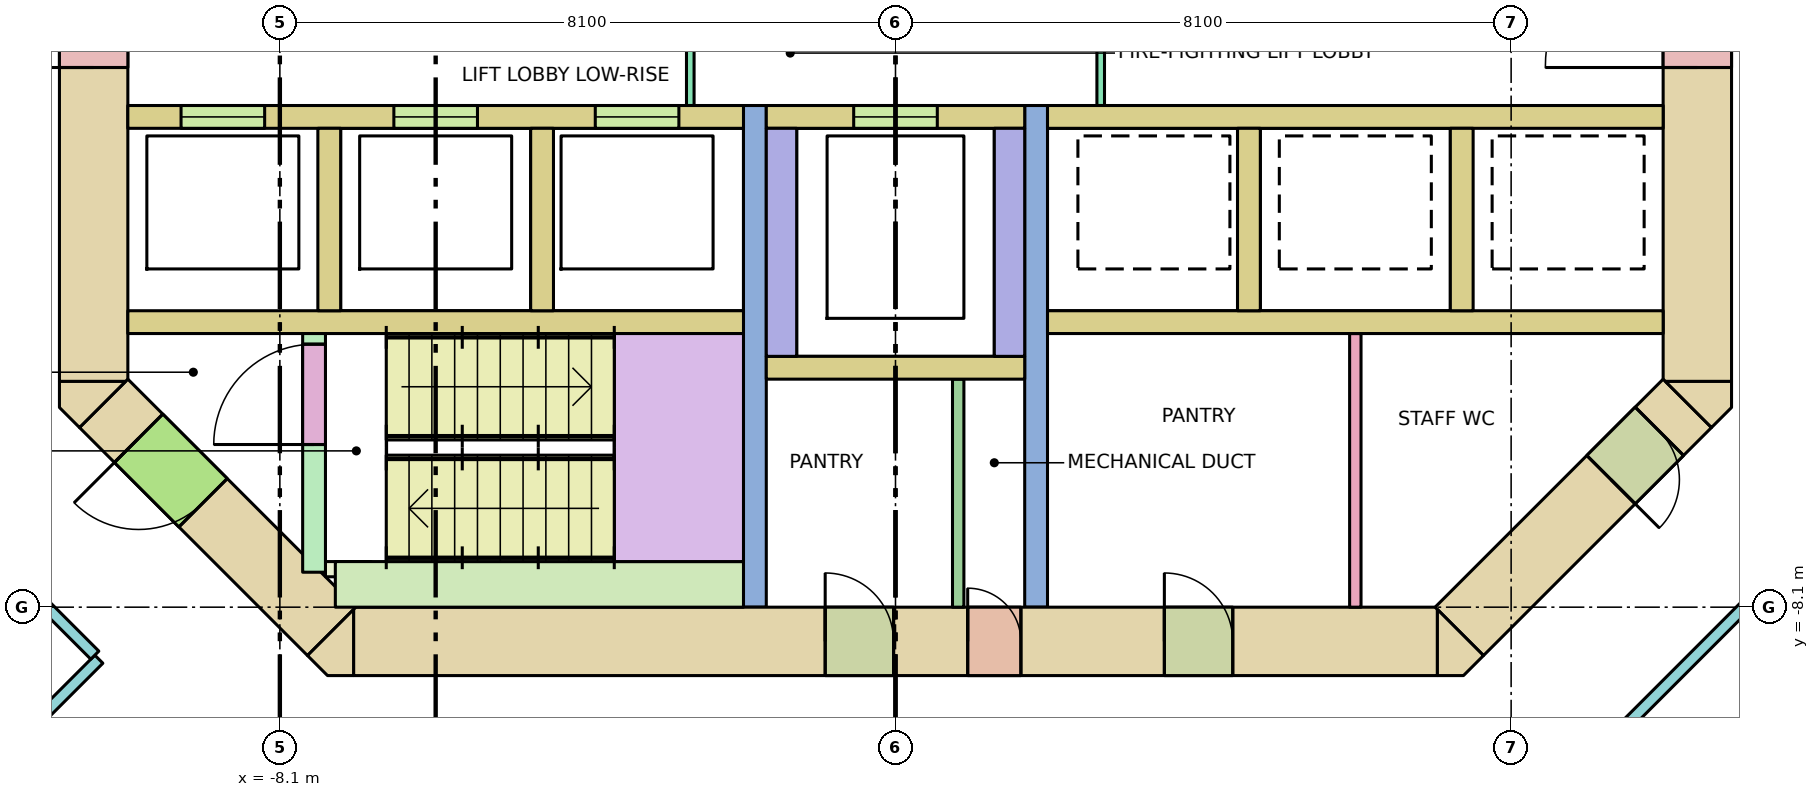
"""IFC4 building model, lengths in metres.
Left out: names, types, materials, properties, quantities, classifications, styles, units other than length and angle.
Written with IfcOpenShell. Run it as: python <this file> out.ifc"""

import sys

from ifc_helpers import new_model, si_unit, direction, frame, frame_2d, origin, place, context, subcontext, project, spatial, polyline, rectangle, outline, extrude, element, fill, save


model = new_model("IFC4")
c1 = context("Model", 3, precision=1e-05, world=origin(), true_north=direction((0.0, 1.0)))
c2 = subcontext(c1, "Body", "Model", "MODEL_VIEW")
j1 = project(units=[si_unit("LENGTHUNIT", "METRE"), si_unit("PLANEANGLEUNIT", "RADIAN")], contexts=[c1])
p1 = place(None, origin())
s1 = spatial("IfcSite", under=j1, at=p1, CompositionType="ELEMENT")
p2 = place(p1, origin())
s2 = spatial("IfcBuilding", under=s1, at=p2, CompositionType="ELEMENT")
p3 = place(p2, frame((0.0, 0.0, 127.6)))
s3 = spatial("IfcBuildingStorey", under=s2, at=p3, CompositionType="ELEMENT", Elevation=127.6)
p4 = place(p3, frame((-7.13, -8.55, -0.28), z_axis=(0.0, 0.0, 1.0), x_axis=(1.0, 0.0, 0.0)))
e1 = element("IfcWall", 1, at=p4, inside=s3, PredefinedType="SHEAR", context=c2, shape_type="SweptSolid", body=[
    extrude(rectangle(XDim=14.26, YDim=0.9, at=frame_2d((7.13, 0.0))), origin(), (0.0, 0.0, 1.0), 3.8),
])
p5 = place(p4, frame((8.08, 0.0, 0.28)))
e2 = element("IfcOpeningElement", 2, at=p5, cuts=e1, PredefinedType="OPENING", context=c2, shape_type="SweptSolid", body=[
    extrude(rectangle(XDim=0.7, YDim=2.1, at=frame_2d((0.35, 1.05))), frame((0.0, 0.46, 0.0), z_axis=(0.0, -1.0, 0.0), x_axis=(1.0, 0.0, 0.0)), (0.0, 0.0, 1.0), 0.92),
])
p6 = place(p4, frame((6.205, 0.0, 0.28)))
e3 = element("IfcOpeningElement", 3, at=p6, cuts=e1, PredefinedType="OPENING", context=c2, shape_type="SweptSolid", body=[
    extrude(rectangle(XDim=0.9, YDim=2.1, at=frame_2d((0.45, 1.05))), frame((0.0, 0.46, 0.0), z_axis=(0.0, -1.0, 0.0), x_axis=(1.0, 0.0, 0.0)), (0.0, 0.0, 1.0), 0.92),
])
p7 = place(p4, frame((10.667, 0.0, 0.28)))
e4 = element("IfcOpeningElement", 4, at=p7, cuts=e1, PredefinedType="OPENING", context=c2, shape_type="SweptSolid", body=[
    extrude(rectangle(XDim=0.9, YDim=2.1, at=frame_2d((0.45, 1.05))), frame((0.0, 0.46, 0.0), z_axis=(0.0, -1.0, 0.0), x_axis=(1.0, 0.0, 0.0)), (0.0, 0.0, 1.0), 0.92),
])
p8 = place(p3, frame((-10.55, -5.13, -0.28), z_axis=(0.0, 0.0, 1.0), x_axis=(0.0, 1.0, 0.0)))
e5 = element("IfcWall", 5, at=p8, inside=s3, PredefinedType="SHEAR", context=c2, shape_type="SweptSolid", body=[
    extrude(rectangle(XDim=10.26, YDim=0.9, at=frame_2d((5.13, 0.0))), origin(), (0.0, 0.0, 1.0), 3.8),
])
p9 = place(p8, frame((4.13, 0.0, 0.28)))
e6 = element("IfcOpeningElement", 6, at=p9, cuts=e5, PredefinedType="OPENING", context=c2, shape_type="SweptSolid", body=[
    extrude(rectangle(XDim=2.0, YDim=2.1, at=frame_2d((1.0, 1.05))), frame((0.0, 0.46, 0.0), z_axis=(0.0, -1.0, 0.0), x_axis=(1.0, 0.0, 0.0)), (0.0, 0.0, 1.0), 0.92),
])
p10 = place(p3, frame((10.55, -5.13, -0.28), z_axis=(0.0, 0.0, 1.0), x_axis=(0.0, 1.0, 0.0)))
e7 = element("IfcWall", 7, at=p10, inside=s3, PredefinedType="SHEAR", context=c2, shape_type="SweptSolid", body=[
    extrude(rectangle(XDim=10.26, YDim=0.9, at=frame_2d((5.13, 0.0))), origin(), (0.0, 0.0, 1.0), 3.8),
])
p11 = place(p10, frame((4.13, 0.0, 0.28)))
e8 = element("IfcOpeningElement", 8, at=p11, cuts=e7, PredefinedType="OPENING", context=c2, shape_type="SweptSolid", body=[
    extrude(rectangle(XDim=2.0, YDim=2.1, at=frame_2d((1.0, 1.05))), frame((0.0, 0.46, 0.0), z_axis=(0.0, -1.0, 0.0), x_axis=(1.0, 0.0, 0.0)), (0.0, 0.0, 1.0), 0.92),
])
p12 = place(p3, frame((10.418, -5.418, -0.28), z_axis=(0.0, 0.0, 1.0), x_axis=(-0.707106781187, -0.707106781187, 0.0)))
e9 = element("IfcWall", 9, at=p12, inside=s3, PredefinedType="SHEAR", context=c2, shape_type="SweptSolid", body=[
    extrude(rectangle(XDim=4.243, YDim=0.9, at=frame_2d((2.121, 0.0))), origin(), (0.0, 0.0, 1.0), 3.8),
])
p13 = place(p12, frame((0.52, 0.0, 0.28)))
e10 = element("IfcOpeningElement", 10, at=p13, cuts=e9, PredefinedType="OPENING", context=c2, shape_type="SweptSolid", body=[
    extrude(rectangle(XDim=0.9, YDim=2.1, at=frame_2d((0.45, 1.05))), frame((0.0, 0.46, 0.0), z_axis=(0.0, -1.0, 0.0), x_axis=(1.0, 0.0, 0.0)), (0.0, 0.0, 1.0), 0.92),
])
p14 = place(p3, frame((-7.418, -8.418, -0.28), z_axis=(0.0, 0.0, 1.0), x_axis=(-0.707106781187, 0.707106781187, 0.0)))
e11 = element("IfcWall", 11, at=p14, inside=s3, PredefinedType="SHEAR", context=c2, shape_type="SweptSolid", body=[
    extrude(rectangle(XDim=4.243, YDim=0.9, at=frame_2d((2.121, 0.0))), origin(), (0.0, 0.0, 1.0), 3.8),
])
p15 = place(p14, frame((2.393, 0.0, 0.28)))
e12 = element("IfcOpeningElement", 12, at=p15, cuts=e11, PredefinedType="OPENING", context=c2, shape_type="SweptSolid", body=[
    extrude(rectangle(XDim=1.2, YDim=2.1, at=frame_2d((0.6, 1.05))), frame((0.0, 0.46, 0.0), z_axis=(0.0, -1.0, 0.0), x_axis=(1.0, 0.0, 0.0)), (0.0, 0.0, 1.0), 0.92),
])
p16 = place(p3, frame((0.0, 0.0, -0.28)))
e13 = element("IfcWall", 13, at=p16, inside=s3, PredefinedType="SHEAR", context=c2, shape_type="SweptSolid", body=[
    extrude(outline(polyline([(-7.473, -9.0), (-7.736, -8.736), (-7.13, -8.13), (-7.13, -9.0), (-7.473, -9.0)])), origin(), (0.0, 0.0, 1.0), 3.8),
])
p17 = place(p3, frame((0.0, 0.0, -0.28)))
e14 = element("IfcWall", 14, at=p17, inside=s3, PredefinedType="SHEAR", context=c2, shape_type="SweptSolid", body=[
    extrude(outline(polyline([(7.473, -9.0), (7.13, -9.0), (7.13, -8.13), (7.736, -8.736), (7.473, -9.0)])), origin(), (0.0, 0.0, 1.0), 3.8),
])
p18 = place(p3, frame((0.0, 0.0, -0.28)))
e15 = element("IfcWall", 15, at=p18, inside=s3, PredefinedType="SHEAR", context=c2, shape_type="SweptSolid", body=[
    extrude(outline(polyline([(-11.0, -5.473), (-11.0, -5.13), (-10.13, -5.13), (-10.736, -5.736), (-11.0, -5.473)])), origin(), (0.0, 0.0, 1.0), 3.8),
])
p19 = place(p3, frame((0.0, 0.0, -0.28)))
e16 = element("IfcWall", 16, at=p19, inside=s3, PredefinedType="SHEAR", context=c2, shape_type="SweptSolid", body=[
    extrude(outline(polyline([(11.0, -5.473), (10.736, -5.736), (10.13, -5.13), (11.0, -5.13), (11.0, -5.473)])), origin(), (0.0, 0.0, 1.0), 3.8),
])
for number, where, z_axis, x_axis in (
    (17, (-10.1, -4.35, 0.0), (0.0, 0.0, 1.0), (1.0, 0.0, 0.0)),
    (18, (2.0, -4.35, 0.0), (0.0, 0.0, 1.0), (1.0, 0.0, 0.0)),
):
    element("IfcWall", number, at=place(p3, frame(where, z_axis=z_axis, x_axis=x_axis)), inside=s3, PredefinedType="SOLIDWALL", context=c2, shape_type="SweptSolid", body=[
        extrude(rectangle(XDim=8.1, YDim=0.3, at=frame_2d((4.05, 0.0))), origin(), (0.0, 0.0, 1.0), 3.52),
    ])
p20 = place(p3, frame((-10.1, -1.65, 0.0), z_axis=(0.0, 0.0, 1.0), x_axis=(1.0, 0.0, 0.0)))
e19 = element("IfcWall", 19, at=p20, inside=s3, PredefinedType="SOLIDWALL", context=c2, shape_type="SweptSolid", body=[
    extrude(rectangle(XDim=8.1, YDim=0.3, at=frame_2d((4.05, 0.0))), origin(), (0.0, 0.0, 1.0), 3.52),
])
p21 = place(p20, frame((0.7, 0.0, 0.0)))
e20 = element("IfcOpeningElement", 20, at=p21, cuts=e19, PredefinedType="OPENING", context=c2, shape_type="SweptSolid", body=[
    extrude(rectangle(XDim=1.1, YDim=2.1, at=frame_2d((0.55, 1.05))), frame((0.0, 0.16, 0.0), z_axis=(0.0, -1.0, 0.0), x_axis=(1.0, 0.0, 0.0)), (0.0, 0.0, 1.0), 0.32),
])
p22 = place(p20, frame((3.5, 0.0, 0.0)))
e21 = element("IfcOpeningElement", 21, at=p22, cuts=e19, PredefinedType="OPENING", context=c2, shape_type="SweptSolid", body=[
    extrude(rectangle(XDim=1.1, YDim=2.1, at=frame_2d((0.55, 1.05))), frame((0.0, 0.16, 0.0), z_axis=(0.0, -1.0, 0.0), x_axis=(1.0, 0.0, 0.0)), (0.0, 0.0, 1.0), 0.32),
])
p23 = place(p20, frame((6.15, 0.0, 0.0)))
e22 = element("IfcOpeningElement", 22, at=p23, cuts=e19, PredefinedType="OPENING", context=c2, shape_type="SweptSolid", body=[
    extrude(rectangle(XDim=1.1, YDim=2.1, at=frame_2d((0.55, 1.05))), frame((0.0, 0.16, 0.0), z_axis=(0.0, -1.0, 0.0), x_axis=(1.0, 0.0, 0.0)), (0.0, 0.0, 1.0), 0.32),
])
p24 = place(p3, frame((2.0, -1.65, 0.0), z_axis=(0.0, 0.0, 1.0), x_axis=(1.0, 0.0, 0.0)))
e23 = element("IfcWall", 23, at=p24, inside=s3, PredefinedType="SOLIDWALL", context=c2, shape_type="SweptSolid", body=[
    extrude(rectangle(XDim=8.1, YDim=0.3, at=frame_2d((4.05, 0.0))), origin(), (0.0, 0.0, 1.0), 3.52),
])
for number, where, z_axis, x_axis in (
    (24, (-7.45, -4.2, 0.0), (0.0, 0.0, 1.0), (0.0, 1.0, 0.0)),
    (25, (-4.65, -4.2, 0.0), (0.0, 0.0, 1.0), (0.0, 1.0, 0.0)),
    (26, (4.65, -4.2, 0.0), (0.0, 0.0, 1.0), (0.0, 1.0, 0.0)),
    (27, (7.45, -4.2, 0.0), (0.0, 0.0, 1.0), (0.0, 1.0, 0.0)),
):
    element("IfcWall", number, at=place(p3, frame(where, z_axis=z_axis, x_axis=x_axis)), inside=s3, PredefinedType="SOLIDWALL", context=c2, shape_type="SweptSolid", body=[
        extrude(rectangle(XDim=2.4, YDim=0.3, at=frame_2d((1.2, 0.0))), origin(), (0.0, 0.0, 1.0), 3.52),
    ])
for number, where, z_axis, x_axis in (
    (28, (-1.85, -8.1, 0.0), (0.0, 0.0, 1.0), (0.0, 1.0, 0.0)),
    (29, (1.85, -8.1, 0.0), (0.0, 0.0, 1.0), (0.0, 1.0, 0.0)),
):
    element("IfcWall", number, at=place(p3, frame(where, z_axis=z_axis, x_axis=x_axis)), inside=s3, PredefinedType="SHEAR", context=c2, shape_type="SweptSolid", body=[
        extrude(rectangle(XDim=6.6, YDim=0.3, at=frame_2d((3.3, 0.0))), origin(), (0.0, 0.0, 1.0), 3.52),
    ])
p25 = place(p3, frame((-1.7, -1.65, 0.0), z_axis=(0.0, 0.0, 1.0), x_axis=(1.0, 0.0, 0.0)))
e30 = element("IfcWall", 30, at=p25, inside=s3, PredefinedType="SOLIDWALL", context=c2, shape_type="SweptSolid", body=[
    extrude(rectangle(XDim=3.4, YDim=0.3, at=frame_2d((1.7, 0.0))), origin(), (0.0, 0.0, 1.0), 3.52),
])
p26 = place(p25, frame((1.15, 0.0, 0.0)))
e31 = element("IfcOpeningElement", 31, at=p26, cuts=e30, PredefinedType="OPENING", context=c2, shape_type="SweptSolid", body=[
    extrude(rectangle(XDim=1.1, YDim=2.1, at=frame_2d((0.55, 1.05))), frame((0.0, 0.16, 0.0), z_axis=(0.0, -1.0, 0.0), x_axis=(1.0, 0.0, 0.0)), (0.0, 0.0, 1.0), 0.32),
])
for number, where, z_axis, x_axis in (
    (32, (-1.5, -4.8, 0.0), (0.0, 0.0, 1.0), (0.0, 1.0, 0.0)),
    (33, (1.5, -4.8, 0.0), (0.0, 0.0, 1.0), (0.0, 1.0, 0.0)),
):
    element("IfcWall", number, at=place(p3, frame(where, z_axis=z_axis, x_axis=x_axis)), inside=s3, PredefinedType="SOLIDWALL", context=c2, shape_type="SweptSolid", body=[
        extrude(rectangle(XDim=3.0, YDim=0.4, at=frame_2d((1.5, 0.0))), origin(), (0.0, 0.0, 1.0), 3.52),
    ])
p27 = place(p3, frame((-1.7, -4.95, 0.0), z_axis=(0.0, 0.0, 1.0), x_axis=(1.0, 0.0, 0.0)))
e34 = element("IfcWall", 34, at=p27, inside=s3, PredefinedType="SOLIDWALL", context=c2, shape_type="SweptSolid", body=[
    extrude(rectangle(XDim=3.4, YDim=0.3, at=frame_2d((1.7, 0.0))), origin(), (0.0, 0.0, 1.0), 3.52),
])
p28 = place(p3, frame((-7.65, -7.64, 0.0), z_axis=(0.0, 0.0, 1.0), x_axis=(0.0, 1.0, 0.0)))
e35 = element("IfcWall", 35, at=p28, inside=s3, PredefinedType="SHEAR", context=c2, shape_type="SweptSolid", body=[
    extrude(rectangle(XDim=3.14, YDim=0.3, at=frame_2d((1.57, 0.0))), origin(), (0.0, 0.0, 1.0), 3.52),
])
p29 = place(p28, frame((1.68, 0.0, 0.0)))
e36 = element("IfcOpeningElement", 36, at=p29, cuts=e35, PredefinedType="OPENING", context=c2, shape_type="SweptSolid", body=[
    extrude(rectangle(XDim=1.32, YDim=2.1, at=frame_2d((0.66, 1.05))), frame((0.0, 0.16, 0.0), z_axis=(0.0, -1.0, 0.0), x_axis=(1.0, 0.0, 0.0)), (0.0, 0.0, 1.0), 0.32),
])
p30 = place(p3, frame((-7.5, -7.6, 0.0), z_axis=(0.0, 0.0, 1.0), x_axis=(1.0, 0.0, 0.0)))
e37 = element("IfcWall", 37, at=p30, inside=s3, PredefinedType="SHEAR", context=c2, shape_type="SweptSolid", body=[
    extrude(rectangle(XDim=0.6, YDim=0.2, at=frame_2d((0.3, 0.0))), origin(), (0.0, 0.0, 1.0), 3.52),
])
p31 = place(p3, frame((-7.37, -7.8, 0.0), z_axis=(0.0, 0.0, 1.0), x_axis=(1.0, 0.0, 0.0)))
e38 = element("IfcWall", 38, at=p31, inside=s3, PredefinedType="SHEAR", context=c2, shape_type="SweptSolid", body=[
    extrude(rectangle(XDim=5.37, YDim=0.6, at=frame_2d((2.685, 0.0))), origin(), (0.0, 0.0, 1.0), 3.52),
])
p32 = place(p3, frame((-2.7, -1.5, 0.0), z_axis=(0.0, 0.0, 1.0), x_axis=(0.0, 1.0, 0.0)))
e39 = element("IfcWall", 39, at=p32, inside=s3, PredefinedType="PARTITIONING", context=c2, shape_type="SweptSolid", body=[
    extrude(rectangle(XDim=3.0, YDim=0.1, at=frame_2d((1.5, 0.0))), origin(), (0.0, 0.0, 1.0), 3.52),
])
p33 = place(p32, frame((0.9, 0.0, 0.0)))
e40 = element("IfcOpeningElement", 40, at=p33, cuts=e39, PredefinedType="OPENING", context=c2, shape_type="SweptSolid", body=[
    extrude(rectangle(XDim=1.2, YDim=2.1, at=frame_2d((0.6, 1.05))), frame((0.0, 0.06, 0.0), z_axis=(0.0, -1.0, 0.0), x_axis=(1.0, 0.0, 0.0)), (0.0, 0.0, 1.0), 0.12),
])
p34 = place(p3, frame((2.7, -1.5, 0.0), z_axis=(0.0, 0.0, 1.0), x_axis=(0.0, 1.0, 0.0)))
e41 = element("IfcWall", 41, at=p34, inside=s3, PredefinedType="PARTITIONING", context=c2, shape_type="SweptSolid", body=[
    extrude(rectangle(XDim=3.0, YDim=0.1, at=frame_2d((1.5, 0.0))), origin(), (0.0, 0.0, 1.0), 3.52),
])
p35 = place(p34, frame((0.9, 0.0, 0.0)))
e42 = element("IfcOpeningElement", 42, at=p35, cuts=e41, PredefinedType="OPENING", context=c2, shape_type="SweptSolid", body=[
    extrude(rectangle(XDim=1.2, YDim=2.1, at=frame_2d((0.6, 1.05))), frame((0.0, 0.06, 0.0), z_axis=(0.0, -1.0, 0.0), x_axis=(1.0, 0.0, 0.0)), (0.0, 0.0, 1.0), 0.12),
])
p36 = place(p3, frame((0.825, -8.1, 0.0), z_axis=(0.0, 0.0, 1.0), x_axis=(0.0, 1.0, 0.0)))
e43 = element("IfcWall", 43, at=p36, inside=s3, PredefinedType="PARTITIONING", context=c2, shape_type="SweptSolid", body=[
    extrude(rectangle(XDim=3.0, YDim=0.15, at=frame_2d((1.5, 0.0))), origin(), (0.0, 0.0, 1.0), 3.52),
])
p37 = place(p3, frame((6.05, -8.1, 0.0), z_axis=(0.0, 0.0, 1.0), x_axis=(0.0, 1.0, 0.0)))
e44 = element("IfcWall", 44, at=p37, inside=s3, PredefinedType="PARTITIONING", context=c2, shape_type="SweptSolid", body=[
    extrude(rectangle(XDim=3.6, YDim=0.15, at=frame_2d((1.8, 0.0))), origin(), (0.0, 0.0, 1.0), 3.52),
])
p38 = place(p3, frame((-14.035, -12.338, 0.0), z_axis=(0.0, 0.0, 1.0), x_axis=(0.707106781187, 0.707106781187, 0.0)))
e45 = element("IfcWall", 45, at=p38, inside=s3, PredefinedType="PARTITIONING", context=c2, shape_type="SweptSolid", body=[
    extrude(rectangle(XDim=5.026, YDim=0.15, at=frame_2d((2.513, 0.0))), origin(), (0.0, 0.0, 1.0), 3.52),
])
p39 = place(p38, frame((2.063, 0.0, 0.0)))
e46 = element("IfcOpeningElement", 46, at=p39, cuts=e45, PredefinedType="OPENING", context=c2, shape_type="SweptSolid", body=[
    extrude(rectangle(XDim=0.9, YDim=2.1, at=frame_2d((0.45, 1.05))), frame((0.0, 0.085, 0.0), z_axis=(0.0, -1.0, 0.0), x_axis=(1.0, 0.0, 0.0)), (0.0, 0.0, 1.0), 0.17),
])
p40 = place(p3, frame((-10.534, -8.731, 0.0), z_axis=(0.0, 0.0, 1.0), x_axis=(-0.707106781187, 0.707106781187, 0.0)))
e47 = element("IfcWall", 47, at=p40, inside=s3, PredefinedType="PARTITIONING", context=c2, shape_type="SweptSolid", body=[
    extrude(rectangle(XDim=3.399, YDim=0.15, at=frame_2d((1.7, 0.0))), origin(), (0.0, 0.0, 1.0), 2.67),
])
p41 = place(p3, frame((12.938, -6.328, 0.0), z_axis=(0.0, 0.0, 1.0), x_axis=(-0.707106781187, -0.707106781187, 0.0)))
e48 = element("IfcWall", 48, at=p41, inside=s3, PredefinedType="PARTITIONING", context=c2, shape_type="SweptSolid", body=[
    extrude(rectangle(XDim=6.52, YDim=0.15, at=frame_2d((3.26, 0.0))), origin(), (0.0, 0.0, 1.0), 2.67),
])
p42 = place(p21, origin())
e49 = element("IfcDoor", 49, at=p42, inside=s3, OperationType="DOUBLE_DOOR_SLIDING", PredefinedType="DOOR", context=c2, shape_type="SweptSolid", body=[
    extrude(rectangle(XDim=1.1, YDim=2.1, at=frame_2d((0.55, 1.05))), frame((0.0, 0.025, 0.0), z_axis=(0.0, -1.0, 0.0), x_axis=(1.0, 0.0, 0.0)), (0.0, 0.0, 1.0), 0.05),
])
fill(e20, e49)
p43 = place(p22, origin())
e50 = element("IfcDoor", 50, at=p43, inside=s3, OperationType="DOUBLE_DOOR_SLIDING", PredefinedType="DOOR", context=c2, shape_type="SweptSolid", body=[
    extrude(rectangle(XDim=1.1, YDim=2.1, at=frame_2d((0.55, 1.05))), frame((0.0, 0.025, 0.0), z_axis=(0.0, -1.0, 0.0), x_axis=(1.0, 0.0, 0.0)), (0.0, 0.0, 1.0), 0.05),
])
fill(e21, e50)
p44 = place(p23, origin())
e51 = element("IfcDoor", 51, at=p44, inside=s3, OperationType="DOUBLE_DOOR_SLIDING", PredefinedType="DOOR", context=c2, shape_type="SweptSolid", body=[
    extrude(rectangle(XDim=1.1, YDim=2.1, at=frame_2d((0.55, 1.05))), frame((0.0, 0.025, 0.0), z_axis=(0.0, -1.0, 0.0), x_axis=(1.0, 0.0, 0.0)), (0.0, 0.0, 1.0), 0.05),
])
fill(e22, e51)
p45 = place(p26, origin())
e52 = element("IfcDoor", 52, at=p45, inside=s3, OperationType="DOUBLE_DOOR_SLIDING", PredefinedType="DOOR", context=c2, shape_type="SweptSolid", body=[
    extrude(rectangle(XDim=1.1, YDim=2.1, at=frame_2d((0.55, 1.05))), frame((0.0, 0.025, 0.0), z_axis=(0.0, -1.0, 0.0), x_axis=(1.0, 0.0, 0.0)), (0.0, 0.0, 1.0), 0.05),
])
fill(e31, e52)
p46 = place(p29, origin())
e53 = element("IfcDoor", 53, at=p46, inside=s3, OperationType="DOUBLE_DOOR_SINGLE_SWING", PredefinedType="DOOR", context=c2, shape_type="SweptSolid", body=[
    extrude(rectangle(XDim=1.32, YDim=2.1, at=frame_2d((0.66, 1.05))), frame((0.0, 0.025, 0.0), z_axis=(0.0, -1.0, 0.0), x_axis=(1.0, 0.0, 0.0)), (0.0, 0.0, 1.0), 0.05),
])
fill(e36, e53)
p47 = place(p15, origin())
e54 = element("IfcDoor", 54, at=p47, inside=s3, OperationType="SINGLE_SWING_RIGHT", PredefinedType="DOOR", context=c2, shape_type="SweptSolid", body=[
    extrude(rectangle(XDim=1.2, YDim=2.1, at=frame_2d((0.6, 1.05))), frame((0.0, 0.025, 0.0), z_axis=(0.0, -1.0, 0.0), x_axis=(1.0, 0.0, 0.0)), (0.0, 0.0, 1.0), 0.05),
])
fill(e12, e54)
p48 = place(p9, origin())
e55 = element("IfcDoor", 55, at=p48, inside=s3, OperationType="DOUBLE_DOOR_SINGLE_SWING", PredefinedType="DOOR", context=c2, shape_type="SweptSolid", body=[
    extrude(rectangle(XDim=2.0, YDim=2.1, at=frame_2d((1.0, 1.05))), frame((0.0, 0.025, 0.0), z_axis=(0.0, -1.0, 0.0), x_axis=(1.0, 0.0, 0.0)), (0.0, 0.0, 1.0), 0.05),
])
fill(e6, e55)
p49 = place(p11, origin())
e56 = element("IfcDoor", 56, at=p49, inside=s3, OperationType="DOUBLE_DOOR_SINGLE_SWING", PredefinedType="DOOR", context=c2, shape_type="SweptSolid", body=[
    extrude(rectangle(XDim=2.0, YDim=2.1, at=frame_2d((1.0, 1.05))), frame((0.0, 0.025, 0.0), z_axis=(0.0, -1.0, 0.0), x_axis=(1.0, 0.0, 0.0)), (0.0, 0.0, 1.0), 0.05),
])
fill(e8, e56)
p50 = place(p5, origin())
e57 = element("IfcDoor", 57, at=p50, inside=s3, OperationType="SINGLE_SWING_LEFT", PredefinedType="DOOR", context=c2, shape_type="SweptSolid", body=[
    extrude(rectangle(XDim=0.7, YDim=2.1, at=frame_2d((0.35, 1.05))), frame((0.0, 0.025, 0.0), z_axis=(0.0, -1.0, 0.0), x_axis=(1.0, 0.0, 0.0)), (0.0, 0.0, 1.0), 0.05),
])
fill(e2, e57)
p51 = place(p6, origin())
e58 = element("IfcDoor", 58, at=p51, inside=s3, OperationType="SINGLE_SWING_LEFT", PredefinedType="DOOR", context=c2, shape_type="SweptSolid", body=[
    extrude(rectangle(XDim=0.9, YDim=2.1, at=frame_2d((0.45, 1.05))), frame((0.0, 0.025, 0.0), z_axis=(0.0, -1.0, 0.0), x_axis=(1.0, 0.0, 0.0)), (0.0, 0.0, 1.0), 0.05),
])
fill(e3, e58)
p52 = place(p7, origin())
e59 = element("IfcDoor", 59, at=p52, inside=s3, OperationType="SINGLE_SWING_LEFT", PredefinedType="DOOR", context=c2, shape_type="SweptSolid", body=[
    extrude(rectangle(XDim=0.9, YDim=2.1, at=frame_2d((0.45, 1.05))), frame((0.0, 0.025, 0.0), z_axis=(0.0, -1.0, 0.0), x_axis=(1.0, 0.0, 0.0)), (0.0, 0.0, 1.0), 0.05),
])
fill(e4, e59)
p53 = place(p13, origin())
e60 = element("IfcDoor", 60, at=p53, inside=s3, OperationType="SINGLE_SWING_RIGHT", PredefinedType="DOOR", context=c2, shape_type="SweptSolid", body=[
    extrude(rectangle(XDim=0.9, YDim=2.1, at=frame_2d((0.45, 1.05))), frame((0.0, 0.025, 0.0), z_axis=(0.0, -1.0, 0.0), x_axis=(1.0, 0.0, 0.0)), (0.0, 0.0, 1.0), 0.05),
])
fill(e10, e60)
save(model, sys.argv[1])
